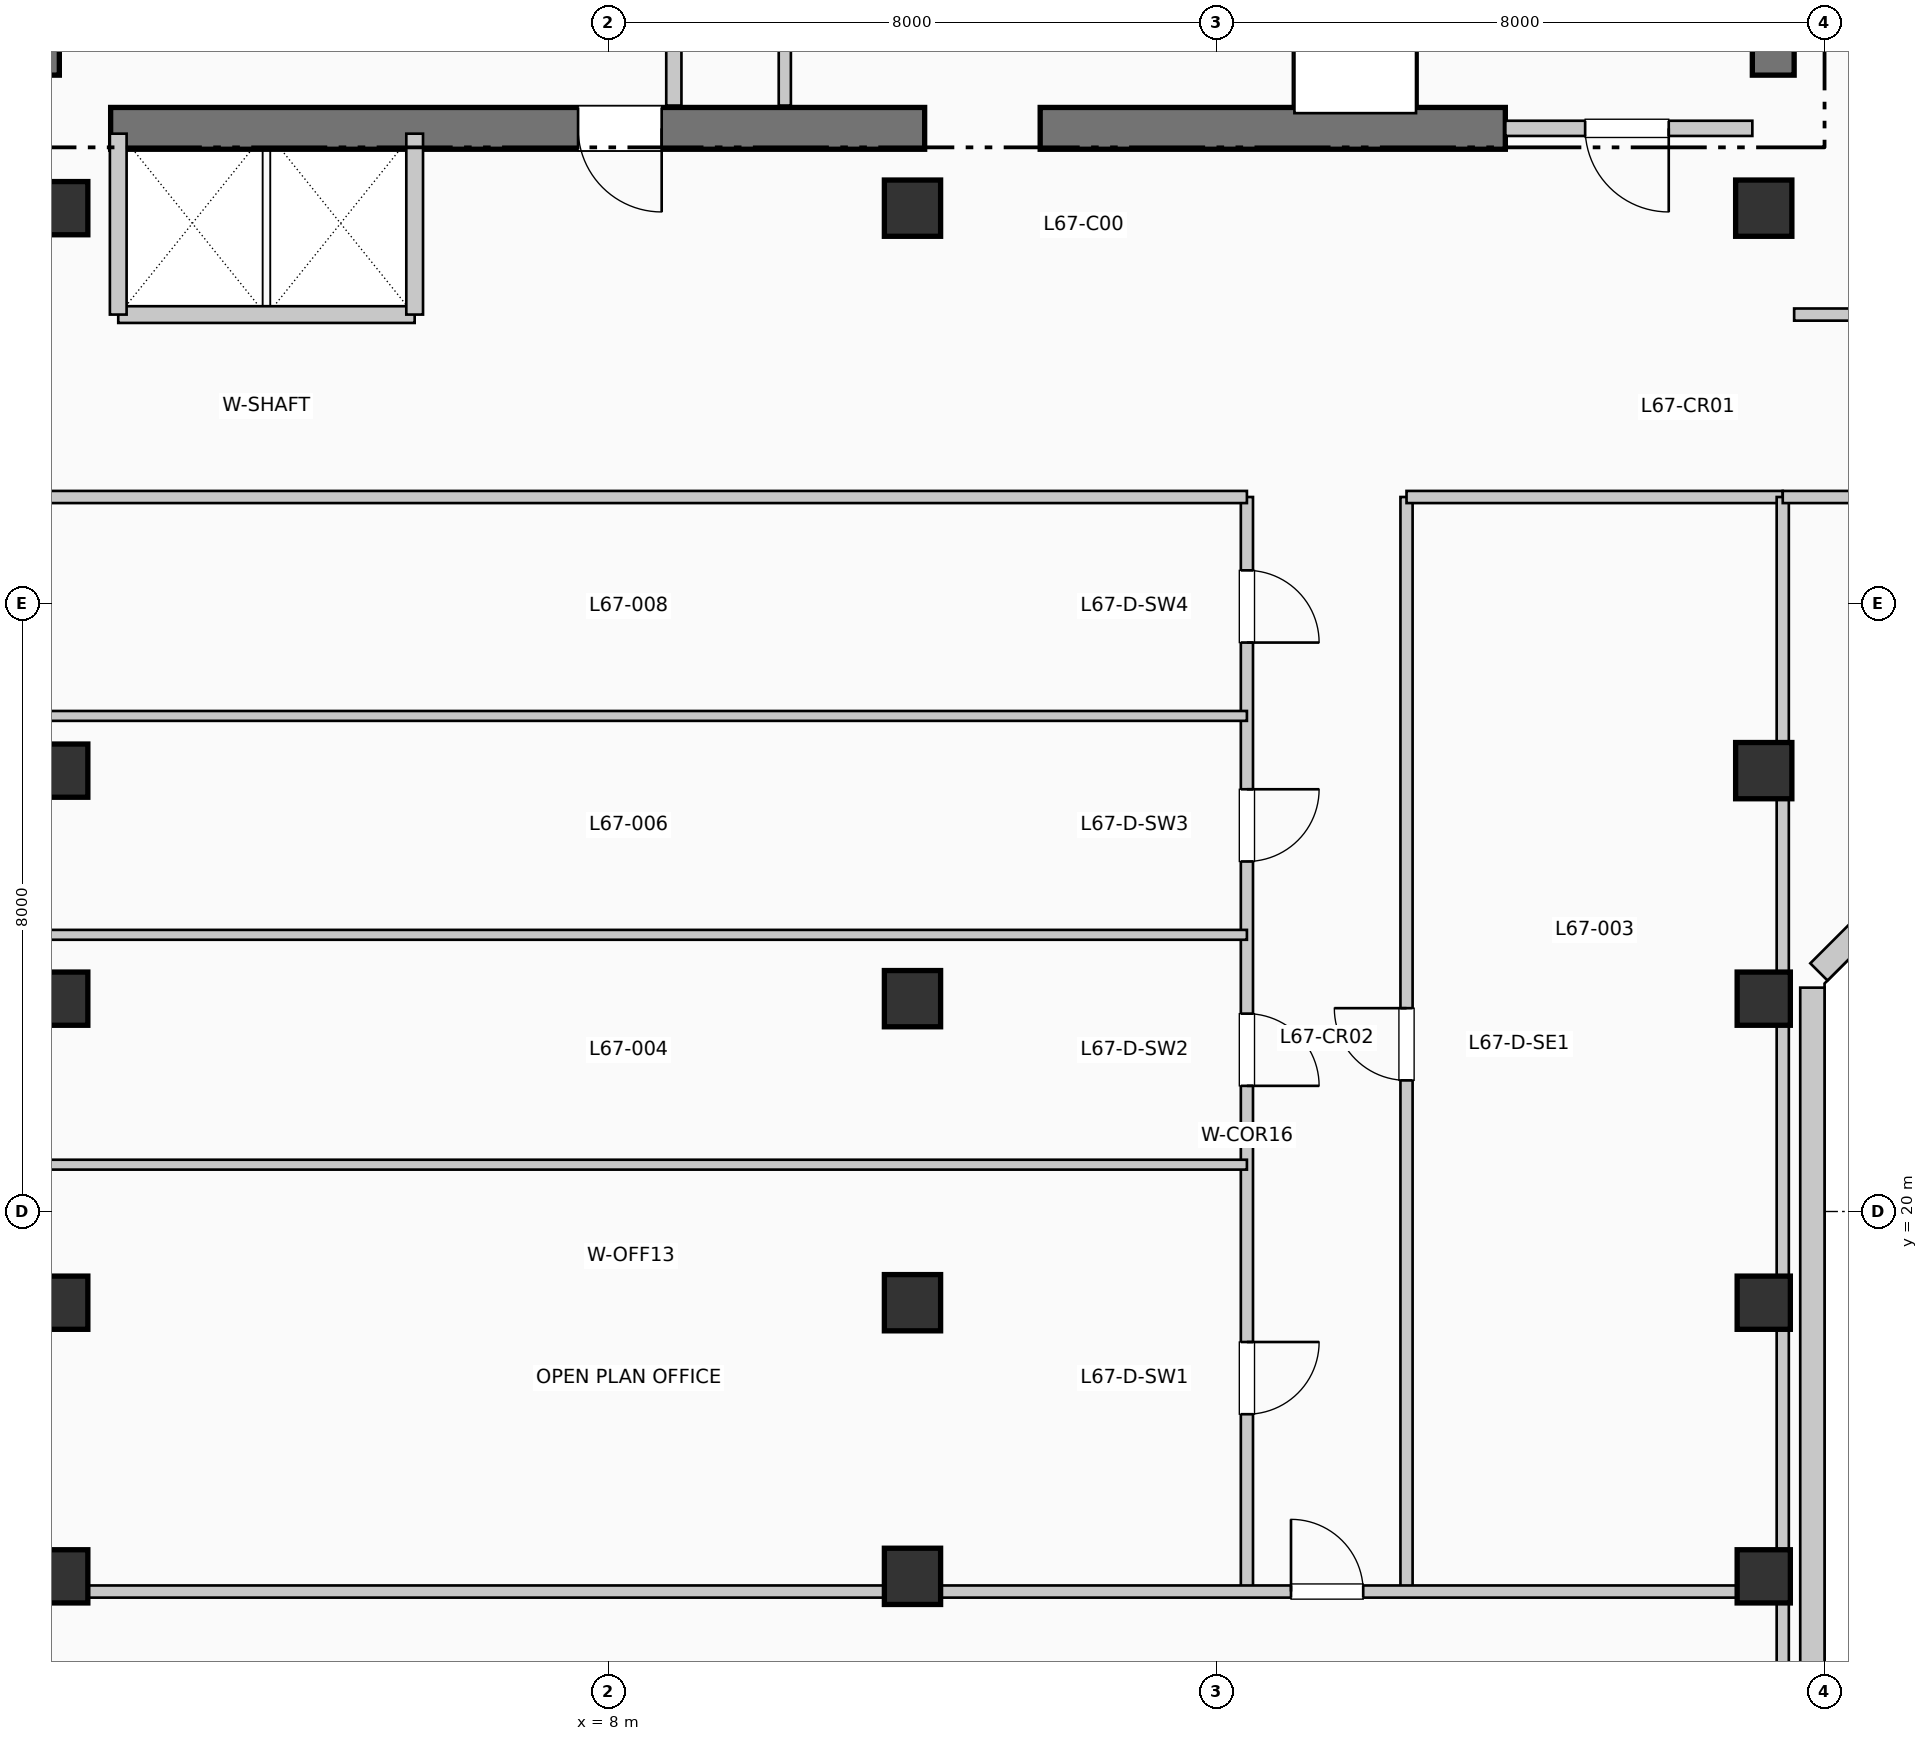
"""IFC4 building model, lengths in metres.
Left out: names, types, materials, properties, quantities, classifications, styles, units other than length and angle.
Written with IfcOpenShell. Run it as: python <this file> out.ifc"""

import sys

from ifc_helpers import new_model, si_unit, direction, frame, frame_2d, origin, origin_2d, place, context, subcontext, project, spatial, rectangle, extrude, element, fill, save


model = new_model("IFC4")
c1 = context("Model", 3, precision=1e-05, world=origin(), true_north=direction((0.0, 1.0)))
c2 = subcontext(c1, "Body", "Model", "MODEL_VIEW")
j1 = project(units=[si_unit("LENGTHUNIT", "METRE"), si_unit("PLANEANGLEUNIT", "RADIAN")], contexts=[c1])
p1 = place(None, origin())
s1 = spatial("IfcSite", under=j1, at=p1, CompositionType="ELEMENT")
p2 = place(p1, origin())
s2 = spatial("IfcBuilding", under=s1, at=p2, CompositionType="ELEMENT")
p3 = place(p2, frame((0.0, 0.0, 276.21)))
s3 = spatial("IfcBuildingStorey", under=s2, at=p3, CompositionType="ELEMENT", Elevation=276.21)
p4 = place(p3, frame((0.5, 34.95, 0.0), z_axis=(0.0, 0.0, 1.0), x_axis=(0.0, 1.0, 0.0)))
e1 = element("IfcWall", 1, at=p4, inside=s3, PredefinedType="SHEAR", context=c2, shape_type="SweptSolid", body=[
    extrude(rectangle(XDim=7.9, YDim=0.55, at=frame_2d((3.95, 0.0))), origin(), (0.0, 0.0, 1.0), 3.96),
])
p5 = place(p3, frame((23.325, 34.95, 0.0), z_axis=(0.0, 0.0, 1.0), x_axis=(0.0, 1.0, 0.0)))
e2 = element("IfcWall", 2, at=p5, inside=s3, PredefinedType="SHEAR", context=c2, shape_type="SweptSolid", body=[
    extrude(rectangle(XDim=10.64, YDim=0.55, at=frame_2d((5.32, 0.0))), origin(), (0.0, 0.0, 1.0), 3.96),
])
p6 = place(p3, frame((1.45, 34.25, 0.0), z_axis=(0.0, 0.0, 1.0), x_axis=(1.0, 0.0, 0.0)))
e3 = element("IfcWall", 3, at=p6, inside=s3, PredefinedType="SHEAR", context=c2, shape_type="SweptSolid", body=[
    extrude(rectangle(XDim=10.71, YDim=0.55, at=frame_2d((5.355, 0.0))), origin(), (0.0, 0.0, 1.0), 3.96),
])
p7 = place(p6, frame((7.25, 0.0, 0.0), z_axis=(0.0, 0.0, 1.0), x_axis=(-1.0, 0.0, 0.0)))
e4 = element("IfcOpeningElement", 4, at=p7, cuts=e3, PredefinedType="OPENING", context=c2, shape_type="SweptSolid", body=[
    extrude(rectangle(XDim=1.1, YDim=2.15, at=frame_2d((0.55, 1.075))), frame((0.0, 0.285, 0.0), z_axis=(0.0, -1.0, 0.0), x_axis=(1.0, 0.0, 0.0)), (0.0, 0.0, 1.0), 0.57),
])
p8 = place(p3, frame((13.68, 34.25, 0.0), z_axis=(0.0, 0.0, 1.0), x_axis=(1.0, 0.0, 0.0)))
e5 = element("IfcWall", 5, at=p8, inside=s3, PredefinedType="SHEAR", context=c2, shape_type="SweptSolid", body=[
    extrude(rectangle(XDim=6.12, YDim=0.55, at=frame_2d((3.06, 0.0))), origin(), (0.0, 0.0, 1.0), 3.96),
])
for number, where, z_axis, x_axis in (
    (6, (0.8, 15.2, 0.0), (0.0, 0.0, 1.0), (1.0, 0.0, 0.0)),
    (7, (0.8, 18.8, 0.0), (0.0, 0.0, 1.0), (1.0, 0.0, 0.0)),
    (8, (0.8, 22.8, 0.0), (0.0, 0.0, 1.0), (1.0, 0.0, 0.0)),
    (9, (0.8, 25.8, 0.0), (0.0, 0.0, 1.0), (1.0, 0.0, 0.0)),
    (10, (0.8, 33.2, 0.0), (0.0, 0.0, 1.0), (1.0, 0.0, 0.0)),
):
    element("IfcColumn", number, at=place(p3, frame(where, z_axis=z_axis, x_axis=x_axis)), inside=s3, PredefinedType="COLUMN", context=c2, shape_type="SweptSolid", body=[
        extrude(rectangle(XDim=0.7, YDim=0.7, at=origin_2d()), origin(), (0.0, 0.0, 1.0), 3.96),
    ])
for number, where, z_axis, x_axis in (
    (11, (12.0, 15.2, 0.0), (0.0, 0.0, 1.0), (1.0, 0.0, 0.0)),
    (12, (12.0, 18.8, 0.0), (0.0, 0.0, 1.0), (1.0, 0.0, 0.0)),
    (13, (12.0, 22.8, 0.0), (0.0, 0.0, 1.0), (1.0, 0.0, 0.0)),
    (14, (12.0, 33.2, 0.0), (0.0, 0.0, 1.0), (1.0, 0.0, 0.0)),
):
    element("IfcColumn", number, at=place(p3, frame(where, z_axis=z_axis, x_axis=x_axis)), inside=s3, PredefinedType="COLUMN", context=c2, shape_type="SweptSolid", body=[
        extrude(rectangle(XDim=0.74, YDim=0.74, at=origin_2d()), origin(), (0.0, 0.0, 1.0), 3.96),
    ])
for number, where, z_axis, x_axis in (
    (15, (23.2, 15.2, 0.0), (0.0, 0.0, 1.0), (1.0, 0.0, 0.0)),
    (16, (23.2, 18.8, 0.0), (0.0, 0.0, 1.0), (1.0, 0.0, 0.0)),
    (17, (23.2, 22.8, 0.0), (0.0, 0.0, 1.0), (1.0, 0.0, 0.0)),
):
    element("IfcColumn", number, at=place(p3, frame(where, z_axis=z_axis, x_axis=x_axis)), inside=s3, PredefinedType="COLUMN", context=c2, shape_type="SweptSolid", body=[
        extrude(rectangle(XDim=0.7, YDim=0.7, at=origin_2d()), origin(), (0.0, 0.0, 1.0), 3.96),
    ])
for number, where, z_axis, x_axis in (
    (18, (23.2, 25.8, 0.0), (0.0, 0.0, 1.0), (1.0, 0.0, 0.0)),
    (19, (23.2, 33.2, 0.0), (0.0, 0.0, 1.0), (1.0, 0.0, 0.0)),
):
    element("IfcColumn", number, at=place(p3, frame(where, z_axis=z_axis, x_axis=x_axis)), inside=s3, PredefinedType="COLUMN", context=c2, shape_type="SweptSolid", body=[
        extrude(rectangle(XDim=0.74, YDim=0.74, at=origin_2d()), origin(), (0.0, 0.0, 1.0), 3.96),
    ])
p9 = place(p3, frame((23.84, 8.855, 0.0), z_axis=(0.0, 0.0, 1.0), x_axis=(0.0, 1.0, 0.0)))
e20 = element("IfcWall", 20, at=p9, inside=s3, PredefinedType="SOLIDWALL", context=c2, shape_type="SweptSolid", body=[
    extrude(rectangle(XDim=14.09, YDim=0.32, at=frame_2d((7.045, 0.0))), origin(), (0.0, 0.0, 1.0), 3.74),
])
p10 = place(p3, frame((23.926, 23.152, 0.0), z_axis=(0.0, 0.0, 1.0), x_axis=(0.707106781187, 0.707106781187, 0.0)))
e21 = element("IfcWall", 21, at=p10, inside=s3, PredefinedType="SOLIDWALL", context=c2, shape_type="SweptSolid", body=[
    extrude(rectangle(XDim=2.718, YDim=0.32, at=frame_2d((1.359, 0.0))), origin(), (0.0, 0.0, 1.0), 3.74),
])
p11 = place(p3, frame((8.86, 34.55, 0.0), z_axis=(0.0, 0.0, 1.0), x_axis=(0.0, 1.0, 0.0)))
e22 = element("IfcWall", 22, at=p11, inside=s3, PredefinedType="PARTITIONING", context=c2, shape_type="SweptSolid", body=[
    extrude(rectangle(XDim=2.5, YDim=0.2, at=frame_2d((1.25, 0.0))), origin(), (0.0, 0.0, 1.0), 3.74),
])
p12 = place(p3, frame((19.8, 34.25, 0.0), z_axis=(0.0, 0.0, 1.0), x_axis=(1.0, 0.0, 0.0)))
e23 = element("IfcWall", 23, at=p12, inside=s3, PredefinedType="PARTITIONING", context=c2, shape_type="SweptSolid", body=[
    extrude(rectangle(XDim=3.25, YDim=0.2, at=frame_2d((1.625, 0.0))), origin(), (0.0, 0.0, 1.0), 3.74),
])
p13 = place(p12, frame((2.15, 0.0, 0.0), z_axis=(0.0, 0.0, 1.0), x_axis=(-1.0, 0.0, 0.0)))
e24 = element("IfcOpeningElement", 24, at=p13, cuts=e23, PredefinedType="OPENING", context=c2, shape_type="SweptSolid", body=[
    extrude(rectangle(XDim=1.1, YDim=2.15, at=frame_2d((0.55, 1.075))), frame((0.0, 0.11, 0.0), z_axis=(0.0, -1.0, 0.0), x_axis=(1.0, 0.0, 0.0)), (0.0, 0.0, 1.0), 0.22),
])
p14 = place(p3, frame((1.55, 31.8, 0.0), z_axis=(0.0, 0.0, 1.0), x_axis=(1.0, 0.0, 0.0)))
e25 = element("IfcWall", 25, at=p14, inside=s3, PredefinedType="PARTITIONING", context=c2, shape_type="SweptSolid", body=[
    extrude(rectangle(XDim=3.9, YDim=0.22, at=frame_2d((1.95, 0.0))), origin(), (0.0, 0.0, 1.0), 3.74),
])
for number, where, z_axis, x_axis in (
    (26, (1.55, 31.8, 0.0), (0.0, 0.0, 1.0), (0.0, 1.0, 0.0)),
    (27, (5.45, 31.8, 0.0), (0.0, 0.0, 1.0), (0.0, 1.0, 0.0)),
):
    element("IfcWall", number, at=place(p3, frame(where, z_axis=z_axis, x_axis=x_axis)), inside=s3, PredefinedType="PARTITIONING", context=c2, shape_type="SweptSolid", body=[
        extrude(rectangle(XDim=2.38, YDim=0.22, at=frame_2d((1.19, 0.0))), origin(), (0.0, 0.0, 1.0), 3.74),
    ])
p15 = place(p3, frame((10.32, 34.55, 0.0), z_axis=(0.0, 0.0, 1.0), x_axis=(0.0, 1.0, 0.0)))
e28 = element("IfcWall", 28, at=p15, inside=s3, PredefinedType="PARTITIONING", context=c2, shape_type="SweptSolid", body=[
    extrude(rectangle(XDim=2.15, YDim=0.16, at=frame_2d((1.075, 0.0))), origin(), (0.0, 0.0, 1.0), 3.74),
])
p16 = place(p3, frame((16.4, 15.0, 0.0), z_axis=(0.0, 0.0, 1.0), x_axis=(0.0, 1.0, 0.0)))
e29 = element("IfcWall", 29, at=p16, inside=s3, PredefinedType="PARTITIONING", context=c2, shape_type="SweptSolid", body=[
    extrude(rectangle(XDim=14.4, YDim=0.16, at=frame_2d((7.2, 0.0))), origin(), (0.0, 0.0, 1.0), 3.74),
])
p17 = place(p16, frame((3.283, 0.0, 0.0), z_axis=(0.0, 0.0, 1.0), x_axis=(-1.0, 0.0, 0.0)))
e30 = element("IfcOpeningElement", 30, at=p17, cuts=e29, PredefinedType="OPENING", context=c2, shape_type="SweptSolid", body=[
    extrude(rectangle(XDim=0.95, YDim=2.15, at=frame_2d((0.475, 1.075))), frame((0.0, 0.09, 0.0), z_axis=(0.0, -1.0, 0.0), x_axis=(1.0, 0.0, 0.0)), (0.0, 0.0, 1.0), 0.18),
])
p18 = place(p16, frame((7.603, 0.0, 0.0), z_axis=(0.0, 0.0, 1.0), x_axis=(-1.0, 0.0, 0.0)))
e31 = element("IfcOpeningElement", 31, at=p18, cuts=e29, PredefinedType="OPENING", context=c2, shape_type="SweptSolid", body=[
    extrude(rectangle(XDim=0.95, YDim=2.15, at=frame_2d((0.475, 1.075))), frame((0.0, 0.09, 0.0), z_axis=(0.0, -1.0, 0.0), x_axis=(1.0, 0.0, 0.0)), (0.0, 0.0, 1.0), 0.18),
])
p19 = place(p16, frame((10.555, 0.0, 0.0), z_axis=(0.0, 0.0, 1.0), x_axis=(-1.0, 0.0, 0.0)))
e32 = element("IfcOpeningElement", 32, at=p19, cuts=e29, PredefinedType="OPENING", context=c2, shape_type="SweptSolid", body=[
    extrude(rectangle(XDim=0.95, YDim=2.15, at=frame_2d((0.475, 1.075))), frame((0.0, 0.09, 0.0), z_axis=(0.0, -1.0, 0.0), x_axis=(1.0, 0.0, 0.0)), (0.0, 0.0, 1.0), 0.18),
])
p20 = place(p16, frame((13.435, 0.0, 0.0), z_axis=(0.0, 0.0, 1.0), x_axis=(-1.0, 0.0, 0.0)))
e33 = element("IfcOpeningElement", 33, at=p20, cuts=e29, PredefinedType="OPENING", context=c2, shape_type="SweptSolid", body=[
    extrude(rectangle(XDim=0.95, YDim=2.15, at=frame_2d((0.475, 1.075))), frame((0.0, 0.09, 0.0), z_axis=(0.0, -1.0, 0.0), x_axis=(1.0, 0.0, 0.0)), (0.0, 0.0, 1.0), 0.18),
])
p21 = place(p3, frame((18.5, 15.0, 0.0), z_axis=(0.0, 0.0, 1.0), x_axis=(0.0, 1.0, 0.0)))
e34 = element("IfcWall", 34, at=p21, inside=s3, PredefinedType="PARTITIONING", context=c2, shape_type="SweptSolid", body=[
    extrude(rectangle(XDim=14.4, YDim=0.16, at=frame_2d((7.2, 0.0))), origin(), (0.0, 0.0, 1.0), 3.74),
])
p22 = place(p21, frame((6.725, 0.0, 0.0)))
e35 = element("IfcOpeningElement", 35, at=p22, cuts=e34, PredefinedType="OPENING", context=c2, shape_type="SweptSolid", body=[
    extrude(rectangle(XDim=0.95, YDim=2.15, at=frame_2d((0.475, 1.075))), frame((0.0, 0.09, 0.0), z_axis=(0.0, -1.0, 0.0), x_axis=(1.0, 0.0, 0.0)), (0.0, 0.0, 1.0), 0.18),
])
p23 = place(p3, frame((0.19, 15.0, 0.0), z_axis=(0.0, 0.0, 1.0), x_axis=(1.0, 0.0, 0.0)))
e36 = element("IfcWall", 36, at=p23, inside=s3, PredefinedType="PARTITIONING", context=c2, shape_type="SweptSolid", body=[
    extrude(rectangle(XDim=23.26, YDim=0.16, at=frame_2d((11.63, 0.0))), origin(), (0.0, 0.0, 1.0), 3.175),
])
p24 = place(p23, frame((16.79, 0.0, 0.0)))
e37 = element("IfcOpeningElement", 37, at=p24, cuts=e36, PredefinedType="OPENING", context=c2, shape_type="SweptSolid", body=[
    extrude(rectangle(XDim=0.95, YDim=2.15, at=frame_2d((0.475, 1.075))), frame((0.0, 0.09, 0.0), z_axis=(0.0, -1.0, 0.0), x_axis=(1.0, 0.0, 0.0)), (0.0, 0.0, 1.0), 0.18),
])
p25 = place(p3, frame((0.19, 29.4, 0.0), z_axis=(0.0, 0.0, 1.0), x_axis=(1.0, 0.0, 0.0)))
e38 = element("IfcWall", 38, at=p25, inside=s3, PredefinedType="PARTITIONING", context=c2, shape_type="SweptSolid", body=[
    extrude(rectangle(XDim=16.21, YDim=0.16, at=frame_2d((8.105, 0.0))), origin(), (0.0, 0.0, 1.0), 3.425),
])
p26 = place(p3, frame((18.5, 29.4, 0.0), z_axis=(0.0, 0.0, 1.0), x_axis=(1.0, 0.0, 0.0)))
e39 = element("IfcWall", 39, at=p26, inside=s3, PredefinedType="PARTITIONING", context=c2, shape_type="SweptSolid", body=[
    extrude(rectangle(XDim=4.95, YDim=0.16, at=frame_2d((2.475, 0.0))), origin(), (0.0, 0.0, 1.0), 3.425),
])
p27 = place(p3, frame((23.45, 5.99, 0.0), z_axis=(0.0, 0.0, 1.0), x_axis=(0.0, 1.0, 0.0)))
e40 = element("IfcWall", 40, at=p27, inside=s3, PredefinedType="PARTITIONING", context=c2, shape_type="SweptSolid", body=[
    extrude(rectangle(XDim=23.41, YDim=0.16, at=frame_2d((11.705, 0.0))), origin(), (0.0, 0.0, 1.0), 3.175),
])
for number, where, z_axis, x_axis in (
    (41, (0.19, 20.616, 0.0), (0.0, 0.0, 1.0), (1.0, 0.0, 0.0)),
    (42, (0.19, 23.64, 0.0), (0.0, 0.0, 1.0), (1.0, 0.0, 0.0)),
    (43, (0.19, 26.52, 0.0), (0.0, 0.0, 1.0), (1.0, 0.0, 0.0)),
):
    element("IfcWall", number, at=place(p3, frame(where, z_axis=z_axis, x_axis=x_axis)), inside=s3, PredefinedType="PARTITIONING", context=c2, shape_type="SweptSolid", body=[
        extrude(rectangle(XDim=16.21, YDim=0.13, at=frame_2d((8.105, 0.0))), origin(), (0.0, 0.0, 1.0), 3.74),
    ])
p28 = place(p3, frame((23.45, 29.4, 0.0), z_axis=(0.0, 0.0, 1.0), x_axis=(1.0, 0.0, 0.0)))
e44 = element("IfcWall", 44, at=p28, inside=s3, PredefinedType="PARTITIONING", context=c2, shape_type="SweptSolid", body=[
    extrude(rectangle(XDim=20.76, YDim=0.16, at=frame_2d((10.38, 0.0))), origin(), (0.0, 0.0, 1.0), 3.425),
])
p29 = place(p28, frame((10.855, 0.0, 0.0), z_axis=(0.0, 0.0, 1.0), x_axis=(-1.0, 0.0, 0.0)))
e45 = element("IfcOpeningElement", 45, at=p29, cuts=e44, PredefinedType="OPENING", context=c2, shape_type="SweptSolid", body=[
    extrude(rectangle(XDim=0.95, YDim=2.15, at=frame_2d((0.475, 1.075))), frame((0.0, 0.09, 0.0), z_axis=(0.0, -1.0, 0.0), x_axis=(1.0, 0.0, 0.0)), (0.0, 0.0, 1.0), 0.18),
])
p30 = place(p3, frame((23.6, 31.8, 0.0), z_axis=(0.0, 0.0, 1.0), x_axis=(1.0, 0.0, 0.0)))
e46 = element("IfcWall", 46, at=p30, inside=s3, PredefinedType="PARTITIONING", context=c2, shape_type="SweptSolid", body=[
    extrude(rectangle(XDim=20.61, YDim=0.16, at=frame_2d((10.305, 0.0))), origin(), (0.0, 0.0, 1.0), 3.74),
])
p31 = place(p30, frame((4.677, 0.0, 0.0)))
e47 = element("IfcOpeningElement", 47, at=p31, cuts=e46, PredefinedType="OPENING", context=c2, shape_type="SweptSolid", body=[
    extrude(rectangle(XDim=0.95, YDim=2.15, at=frame_2d((0.475, 1.075))), frame((0.0, 0.09, 0.0), z_axis=(0.0, -1.0, 0.0), x_axis=(1.0, 0.0, 0.0)), (0.0, 0.0, 1.0), 0.18),
])
p32 = place(p30, frame((14.982, 0.0, 0.0)))
e48 = element("IfcOpeningElement", 48, at=p32, cuts=e46, PredefinedType="OPENING", context=c2, shape_type="SweptSolid", body=[
    extrude(rectangle(XDim=0.95, YDim=2.15, at=frame_2d((0.475, 1.075))), frame((0.0, 0.09, 0.0), z_axis=(0.0, -1.0, 0.0), x_axis=(1.0, 0.0, 0.0)), (0.0, 0.0, 1.0), 0.18),
])
p33 = place(p7, origin())
e49 = element("IfcDoor", 49, at=p33, inside=s3, OperationType="SINGLE_SWING_RIGHT", PredefinedType="DOOR", context=c2, shape_type="SweptSolid", body=[
    extrude(rectangle(XDim=1.1, YDim=2.15, at=frame_2d((0.55, 1.075))), frame((0.0, 0.025, 0.0), z_axis=(0.0, -1.0, 0.0), x_axis=(1.0, 0.0, 0.0)), (0.0, 0.0, 1.0), 0.05),
])
fill(e4, e49)
p34 = place(p13, origin())
e50 = element("IfcDoor", 50, at=p34, inside=s3, OperationType="SINGLE_SWING_RIGHT", PredefinedType="DOOR", context=c2, shape_type="SweptSolid", body=[
    extrude(rectangle(XDim=1.1, YDim=2.15, at=frame_2d((0.55, 1.075))), frame((0.0, 0.025, 0.0), z_axis=(0.0, -1.0, 0.0), x_axis=(1.0, 0.0, 0.0)), (0.0, 0.0, 1.0), 0.05),
])
fill(e24, e50)
p35 = place(p24, origin())
e51 = element("IfcDoor", 51, at=p35, inside=s3, OperationType="SINGLE_SWING_LEFT", PredefinedType="DOOR", context=c2, shape_type="SweptSolid", body=[
    extrude(rectangle(XDim=0.95, YDim=2.15, at=frame_2d((0.475, 1.075))), frame((0.0, 0.025, 0.0), z_axis=(0.0, -1.0, 0.0), x_axis=(1.0, 0.0, 0.0)), (0.0, 0.0, 1.0), 0.05),
])
fill(e37, e51)
p36 = place(p17, origin())
e52 = element("IfcDoor", 52, at=p36, inside=s3, OperationType="SINGLE_SWING_RIGHT", PredefinedType="DOOR", context=c2, shape_type="SweptSolid", body=[
    extrude(rectangle(XDim=0.95, YDim=2.15, at=frame_2d((0.475, 1.075))), frame((0.0, 0.025, 0.0), z_axis=(0.0, -1.0, 0.0), x_axis=(1.0, 0.0, 0.0)), (0.0, 0.0, 1.0), 0.05),
])
fill(e30, e52)
p37 = place(p18, origin())
e53 = element("IfcDoor", 53, at=p37, inside=s3, OperationType="SINGLE_SWING_LEFT", PredefinedType="DOOR", context=c2, shape_type="SweptSolid", body=[
    extrude(rectangle(XDim=0.95, YDim=2.15, at=frame_2d((0.475, 1.075))), frame((0.0, 0.025, 0.0), z_axis=(0.0, -1.0, 0.0), x_axis=(1.0, 0.0, 0.0)), (0.0, 0.0, 1.0), 0.05),
])
fill(e31, e53)
p38 = place(p19, origin())
e54 = element("IfcDoor", 54, at=p38, inside=s3, OperationType="SINGLE_SWING_RIGHT", PredefinedType="DOOR", context=c2, shape_type="SweptSolid", body=[
    extrude(rectangle(XDim=0.95, YDim=2.15, at=frame_2d((0.475, 1.075))), frame((0.0, 0.025, 0.0), z_axis=(0.0, -1.0, 0.0), x_axis=(1.0, 0.0, 0.0)), (0.0, 0.0, 1.0), 0.05),
])
fill(e32, e54)
p39 = place(p20, origin())
e55 = element("IfcDoor", 55, at=p39, inside=s3, OperationType="SINGLE_SWING_LEFT", PredefinedType="DOOR", context=c2, shape_type="SweptSolid", body=[
    extrude(rectangle(XDim=0.95, YDim=2.15, at=frame_2d((0.475, 1.075))), frame((0.0, 0.025, 0.0), z_axis=(0.0, -1.0, 0.0), x_axis=(1.0, 0.0, 0.0)), (0.0, 0.0, 1.0), 0.05),
])
fill(e33, e55)
p40 = place(p22, origin())
e56 = element("IfcDoor", 56, at=p40, inside=s3, OperationType="SINGLE_SWING_RIGHT", PredefinedType="DOOR", context=c2, shape_type="SweptSolid", body=[
    extrude(rectangle(XDim=0.95, YDim=2.15, at=frame_2d((0.475, 1.075))), frame((0.0, 0.025, 0.0), z_axis=(0.0, -1.0, 0.0), x_axis=(1.0, 0.0, 0.0)), (0.0, 0.0, 1.0), 0.05),
])
fill(e35, e56)
save(model, sys.argv[1])
